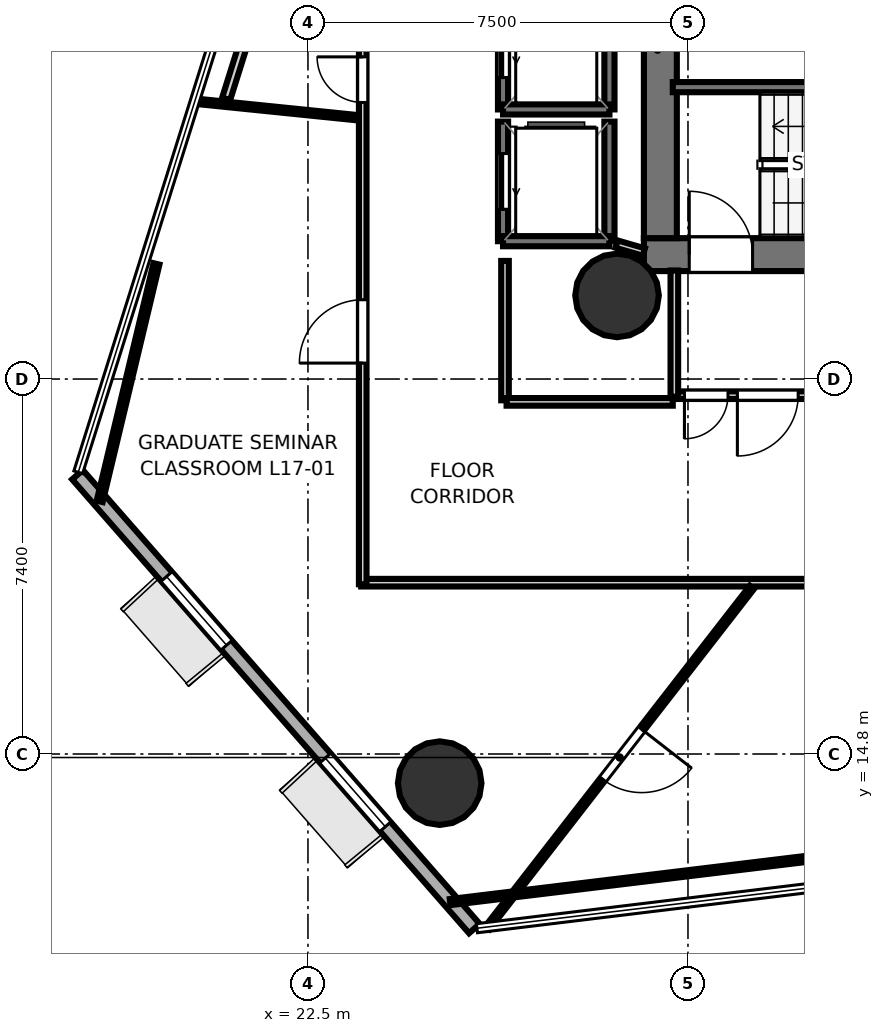
"""IFC4 building model, lengths in metres.
Left out: names, types, materials, properties, quantities, classifications, styles, units other than length and angle.
Written with IfcOpenShell. Run it as: python <this file> out.ifc"""

import sys

from ifc_helpers import new_model, si_unit, direction, frame, frame_2d, origin, origin_2d, place, context, subcontext, project, spatial, rectangle, hollow_circle, extrude, element, fill, save


model = new_model("IFC4")
c1 = context("Model", 3, precision=1e-05, world=origin(), true_north=direction((0.0, 1.0)))
c2 = subcontext(c1, "Body", "Model", "MODEL_VIEW")
j1 = project(units=[si_unit("LENGTHUNIT", "METRE"), si_unit("PLANEANGLEUNIT", "RADIAN")], contexts=[c1])
p1 = place(None, origin())
s1 = spatial("IfcSite", under=j1, at=p1, CompositionType="ELEMENT")
p2 = place(p1, origin())
s2 = spatial("IfcBuilding", under=s1, at=p2, CompositionType="ELEMENT")
p3 = place(p2, frame((0.0, 0.0, 71.0)))
s3 = spatial("IfcBuildingStorey", under=s2, at=p3, CompositionType="ELEMENT", Elevation=71.0)
p4 = place(p3, frame((29.13, 24.655, 0.0), z_axis=(0.0, 0.0, 1.0), x_axis=(1.0, 0.0, 0.0)))
e1 = element("IfcWall", 1, at=p4, inside=s3, PredefinedType="SHEAR", context=c2, shape_type="SweptSolid", body=[
    extrude(rectangle(XDim=10.72, YDim=0.65, at=frame_2d((5.36, 0.0))), origin(), (0.0, 0.0, 1.0), 3.52),
])
p5 = place(p4, frame((0.895, 0.0, 0.0)))
e2 = element("IfcOpeningElement", 2, at=p5, cuts=e1, PredefinedType="OPENING", context=c2, shape_type="SweptSolid", body=[
    extrude(rectangle(XDim=1.25, YDim=2.15, at=frame_2d((0.625, 1.075))), frame((0.0, 0.335, 0.0), z_axis=(0.0, -1.0, 0.0), x_axis=(1.0, 0.0, 0.0)), (0.0, 0.0, 1.0), 0.67),
])
p6 = place(p3, frame((29.455, 24.98, 0.0), z_axis=(0.0, 0.0, 1.0), x_axis=(0.0, 1.0, 0.0)))
e3 = element("IfcWall", 3, at=p6, inside=s3, PredefinedType="SHEAR", context=c2, shape_type="SweptSolid", body=[
    extrude(rectangle(XDim=7.44, YDim=0.65, at=frame_2d((3.72, 0.0))), origin(), (0.0, 0.0, 1.0), 3.52),
])
for number, where, z_axis, x_axis in (
    (4, (28.6, 23.85, 0.0), (0.0, 0.0, 1.0), (1.0, 0.0, 0.0)),
    (5, (25.1, 14.225, 0.0), (0.0, 0.0, 1.0), (1.0, 0.0, 0.0)),
):
    element("IfcColumn", number, at=place(p3, frame(where, z_axis=z_axis, x_axis=x_axis)), inside=s3, PredefinedType="COLUMN", context=c2, shape_type="SweptSolid", body=[
        extrude(hollow_circle(Radius=0.825, WallThickness=0.04, at=origin_2d()), origin(), (0.0, 0.0, 1.0), 3.7),
    ])
p7 = place(p3, frame((17.952, 20.312, 0.0), z_axis=(0.0, 0.0, 1.0), x_axis=(0.658347705973, -0.752713954992, 0.0)))
e6 = element("IfcWall", 6, at=p7, inside=s3, PredefinedType="SOLIDWALL", context=c2, shape_type="SweptSolid", body=[
    extrude(rectangle(XDim=11.898, YDim=0.28, at=frame_2d((5.949, 0.0))), origin(), (0.0, 0.0, 1.0), 3.52),
])
p8 = place(p7, frame((2.669, 0.0, 0.85)))
e7 = element("IfcOpeningElement", 7, at=p8, cuts=e6, PredefinedType="OPENING", context=c2, shape_type="SweptSolid", body=[
    extrude(rectangle(XDim=1.8, YDim=2.1, at=frame_2d((0.9, 1.05))), frame((0.0, 0.15, 0.0), z_axis=(0.0, -1.0, 0.0), x_axis=(1.0, 0.0, 0.0)), (0.0, 0.0, 1.0), 0.3),
])
p9 = place(p7, frame((7.429, 0.0, 0.85)))
e8 = element("IfcOpeningElement", 8, at=p9, cuts=e6, PredefinedType="OPENING", context=c2, shape_type="SweptSolid", body=[
    extrude(rectangle(XDim=1.8, YDim=2.1, at=frame_2d((0.9, 1.05))), frame((0.0, 0.15, 0.0), z_axis=(0.0, -1.0, 0.0), x_axis=(1.0, 0.0, 0.0)), (0.0, 0.0, 1.0), 0.3),
])
p10 = place(p3, frame((29.7, 27.96, 0.0), z_axis=(0.0, 0.0, 1.0), x_axis=(1.0, 0.0, 0.0)))
e9 = element("IfcWall", 9, at=p10, inside=s3, PredefinedType="SOLIDWALL", context=c2, shape_type="SweptSolid", body=[
    extrude(rectangle(XDim=7.75, YDim=0.2, at=frame_2d((3.875, 0.0))), origin(), (0.0, 0.0, 1.0), 3.52),
])
p11 = place(p3, frame((28.45, 27.52, 0.0), z_axis=(0.0, 0.0, 1.0), x_axis=(0.0, 1.0, 0.0)))
e10 = element("IfcWall", 10, at=p11, inside=s3, PredefinedType="SOLIDWALL", context=c2, shape_type="SweptSolid", body=[
    extrude(rectangle(XDim=2.36, YDim=0.2, at=frame_2d((1.18, 0.0))), origin(), (0.0, 0.0, 1.0), 3.52),
])
p12 = place(p3, frame((26.35, 27.52, 0.0), z_axis=(0.0, 0.0, 1.0), x_axis=(0.0, 1.0, 0.0)))
e11 = element("IfcWall", 11, at=p12, inside=s3, PredefinedType="SOLIDWALL", context=c2, shape_type="SweptSolid", body=[
    extrude(rectangle(XDim=2.36, YDim=0.2, at=frame_2d((1.18, 0.0))), origin(), (0.0, 0.0, 1.0), 3.52),
])
p13 = place(p12, frame((0.63, 0.0, 0.0)))
e12 = element("IfcOpeningElement", 12, at=p13, cuts=e11, PredefinedType="OPENING", context=c2, shape_type="SweptSolid", body=[
    extrude(rectangle(XDim=1.1, YDim=2.15, at=frame_2d((0.55, 1.075))), frame((0.0, 0.11, 0.0), z_axis=(0.0, -1.0, 0.0), x_axis=(1.0, 0.0, 0.0)), (0.0, 0.0, 1.0), 0.22),
])
p14 = place(p3, frame((26.35, 27.52, 0.0), z_axis=(0.0, 0.0, 1.0), x_axis=(1.0, 0.0, 0.0)))
e13 = element("IfcWall", 13, at=p14, inside=s3, PredefinedType="SOLIDWALL", context=c2, shape_type="SweptSolid", body=[
    extrude(rectangle(XDim=2.1, YDim=0.2, at=frame_2d((1.05, 0.0))), origin(), (0.0, 0.0, 1.0), 3.52),
])
p15 = place(p3, frame((28.45, 24.92, 0.0), z_axis=(0.0, 0.0, 1.0), x_axis=(0.0, 1.0, 0.0)))
e14 = element("IfcWall", 14, at=p15, inside=s3, PredefinedType="SOLIDWALL", context=c2, shape_type="SweptSolid", body=[
    extrude(rectangle(XDim=2.36, YDim=0.2, at=frame_2d((1.18, 0.0))), origin(), (0.0, 0.0, 1.0), 3.52),
])
p16 = place(p3, frame((26.35, 24.92, 0.0), z_axis=(0.0, 0.0, 1.0), x_axis=(0.0, 1.0, 0.0)))
e15 = element("IfcWall", 15, at=p16, inside=s3, PredefinedType="SOLIDWALL", context=c2, shape_type="SweptSolid", body=[
    extrude(rectangle(XDim=2.36, YDim=0.2, at=frame_2d((1.18, 0.0))), origin(), (0.0, 0.0, 1.0), 3.52),
])
p17 = place(p16, frame((0.63, 0.0, 0.0)))
e16 = element("IfcOpeningElement", 16, at=p17, cuts=e15, PredefinedType="OPENING", context=c2, shape_type="SweptSolid", body=[
    extrude(rectangle(XDim=1.1, YDim=2.15, at=frame_2d((0.55, 1.075))), frame((0.0, 0.11, 0.0), z_axis=(0.0, -1.0, 0.0), x_axis=(1.0, 0.0, 0.0)), (0.0, 0.0, 1.0), 0.22),
])
p18 = place(p3, frame((26.35, 24.92, 0.0), z_axis=(0.0, 0.0, 1.0), x_axis=(1.0, 0.0, 0.0)))
e17 = element("IfcWall", 17, at=p18, inside=s3, PredefinedType="SOLIDWALL", context=c2, shape_type="SweptSolid", body=[
    extrude(rectangle(XDim=2.1, YDim=0.2, at=frame_2d((1.05, 0.0))), origin(), (0.0, 0.0, 1.0), 3.52),
])
p19 = place(p3, frame((33.45, 21.881, 0.0), z_axis=(0.0, 0.0, 1.0), x_axis=(-1.0, 0.0, 0.0)))
e18 = element("IfcWall", 18, at=p19, inside=s3, PredefinedType="PARTITIONING", context=c2, shape_type="SweptSolid", body=[
    extrude(rectangle(XDim=3.75, YDim=0.15, at=frame_2d((1.875, 0.0))), origin(), (0.0, 0.0, 1.0), 2.84),
])
p20 = place(p19, frame((1.275, 0.0, 0.0)))
e19 = element("IfcOpeningElement", 19, at=p20, cuts=e18, PredefinedType="OPENING", context=c2, shape_type="SweptSolid", body=[
    extrude(rectangle(XDim=1.2, YDim=2.15, at=frame_2d((0.6, 1.075))), frame((0.0, 0.085, 0.0), z_axis=(0.0, -1.0, 0.0), x_axis=(1.0, 0.0, 0.0)), (0.0, 0.0, 1.0), 0.17),
])
p21 = place(p19, frame((2.66, 0.0, 0.0)))
e20 = element("IfcOpeningElement", 20, at=p21, cuts=e18, PredefinedType="OPENING", context=c2, shape_type="SweptSolid", body=[
    extrude(rectangle(XDim=0.86, YDim=2.05, at=frame_2d((0.43, 1.025))), frame((0.0, 0.085, 0.0), z_axis=(0.0, -1.0, 0.0), x_axis=(1.0, 0.0, 0.0)), (0.0, 0.0, 1.0), 0.17),
])
p22 = place(p3, frame((29.731, 21.85, 0.0), z_axis=(0.0, 0.0, 1.0), x_axis=(0.0, 1.0, 0.0)))
e21 = element("IfcWall", 21, at=p22, inside=s3, PredefinedType="PARTITIONING", context=c2, shape_type="SweptSolid", body=[
    extrude(rectangle(XDim=2.492, YDim=0.15, at=frame_2d((1.246, 0.0))), origin(), (0.0, 0.0, 1.0), 2.84),
])
p23 = place(p3, frame((29.13, 24.706, 0.0), z_axis=(0.0, 0.0, 1.0), x_axis=(-0.960451214223, 0.278448316742, 0.0)))
e22 = element("IfcWall", 22, at=p23, inside=s3, PredefinedType="PARTITIONING", context=c2, shape_type="SweptSolid", body=[
    extrude(rectangle(XDim=0.562, YDim=0.15, at=frame_2d((0.281, 0.0))), origin(), (0.0, 0.0, 1.0), 2.84),
])
p24 = place(p3, frame((26.389, 24.531, 0.0), z_axis=(0.0, 0.0, 1.0), x_axis=(0.0, -1.0, 0.0)))
e23 = element("IfcWall", 23, at=p24, inside=s3, PredefinedType="PARTITIONING", context=c2, shape_type="SweptSolid", body=[
    extrude(rectangle(XDim=2.75, YDim=0.15, at=frame_2d((1.375, 0.0))), origin(), (0.0, 0.0, 1.0), 2.84),
])
p25 = place(p3, frame((26.42, 21.749, 0.0), z_axis=(0.0, 0.0, 1.0), x_axis=(1.0, 0.0, 0.0)))
e24 = element("IfcWall", 24, at=p25, inside=s3, PredefinedType="PARTITIONING", context=c2, shape_type="SweptSolid", body=[
    extrude(rectangle(XDim=3.28, YDim=0.15, at=frame_2d((1.64, 0.0))), origin(), (0.0, 0.0, 1.0), 2.84),
])
p26 = place(p3, frame((33.32, 18.181, 0.0), z_axis=(0.0, 0.0, 1.0), x_axis=(-1.0, 0.0, 0.0)))
e25 = element("IfcWall", 25, at=p26, inside=s3, PredefinedType="PARTITIONING", context=c2, shape_type="SweptSolid", body=[
    extrude(rectangle(XDim=9.77, YDim=0.15, at=frame_2d((4.885, 0.0))), origin(), (0.0, 0.0, 1.0), 2.798),
])
p27 = place(p3, frame((23.581, 18.15, 0.0), z_axis=(0.0, 0.0, 1.0), x_axis=(0.0, 1.0, 0.0)))
e26 = element("IfcWall", 26, at=p27, inside=s3, PredefinedType="PARTITIONING", context=c2, shape_type="SweptSolid", body=[
    extrude(rectangle(XDim=11.333, YDim=0.15, at=frame_2d((5.667, 0.0))), origin(), (0.0, 0.0, 1.0), 2.798),
])
p28 = place(p27, frame((4.365, 0.0, 0.0)))
e27 = element("IfcOpeningElement", 27, at=p28, cuts=e26, PredefinedType="OPENING", context=c2, shape_type="SweptSolid", body=[
    extrude(rectangle(XDim=1.25, YDim=2.2, at=frame_2d((0.625, 1.1))), frame((0.0, 0.085, 0.0), z_axis=(0.0, -1.0, 0.0), x_axis=(1.0, 0.0, 0.0)), (0.0, 0.0, 1.0), 0.17),
])
p29 = place(p27, frame((9.507, 0.0, 0.0)))
e28 = element("IfcOpeningElement", 28, at=p29, cuts=e26, PredefinedType="OPENING", context=c2, shape_type="SweptSolid", body=[
    extrude(rectangle(XDim=0.9, YDim=2.1, at=frame_2d((0.45, 1.05))), frame((0.0, 0.085, 0.0), z_axis=(0.0, -1.0, 0.0), x_axis=(1.0, 0.0, 0.0)), (0.0, 0.0, 1.0), 0.17),
])
p30 = place(p3, frame((31.262, 18.089, 0.0), z_axis=(0.0, 0.0, 1.0), x_axis=(-0.613499332292, -0.789695238226, 0.0)))
e29 = element("IfcWall", 29, at=p30, inside=s3, PredefinedType="PARTITIONING", context=c2, shape_type="SweptSolid", body=[
    extrude(rectangle(XDim=8.505, YDim=0.105, at=frame_2d((4.252, 0.0))), origin(), (0.0, 0.0, 1.0), 2.798),
])
p31 = place(p30, frame((3.547, 0.0, 0.0)))
e30 = element("IfcOpeningElement", 30, at=p31, cuts=e29, PredefinedType="OPENING", context=c2, shape_type="SweptSolid", body=[
    extrude(rectangle(XDim=1.25, YDim=2.2, at=frame_2d((0.625, 1.1))), frame((0.0, 0.062, 0.0), z_axis=(0.0, -1.0, 0.0), x_axis=(1.0, 0.0, 0.0)), (0.0, 0.0, 1.0), 0.125),
])
p32 = place(p3, frame((18.39, 19.785, 0.0), z_axis=(0.0, 0.0, 1.0), x_axis=(0.23249925899, 0.97259657339, 0.0)))
e31 = element("IfcWall", 31, at=p32, inside=s3, PredefinedType="PARTITIONING", context=c2, shape_type="SweptSolid", body=[
    extrude(rectangle(XDim=4.82, YDim=0.12, at=frame_2d((2.41, 0.0))), origin(), (0.0, 0.0, 1.0), 2.84),
])
p33 = place(p3, frame((20.248, 27.686, 0.0), z_axis=(0.0, 0.0, 1.0), x_axis=(0.994844867068, -0.101408532525, 0.0)))
e32 = element("IfcWall", 32, at=p33, inside=s3, PredefinedType="PARTITIONING", context=c2, shape_type="SweptSolid", body=[
    extrude(rectangle(XDim=3.236, YDim=0.105, at=frame_2d((1.618, 0.0))), origin(), (0.0, 0.0, 1.0), 2.798),
])
p34 = place(p3, frame((55.221, 15.505, 0.0), z_axis=(0.0, 0.0, 1.0), x_axis=(-0.992729059423, -0.120370322663, 0.0)))
e33 = element("IfcWall", 33, at=p34, inside=s3, PredefinedType="PARTITIONING", context=c2, shape_type="SweptSolid", body=[
    extrude(rectangle(XDim=30.134, YDim=0.12, at=frame_2d((15.067, 0.0))), origin(), (0.0, 0.0, 1.0), 2.798),
])
p35 = place(p3, frame((20.886, 27.73, 0.0), z_axis=(0.0, 0.0, 1.0), x_axis=(0.299685371056, 0.954038090631, 0.0)))
e34 = element("IfcWall", 34, at=p35, inside=s3, PredefinedType="PLUMBINGWALL", context=c2, shape_type="SweptSolid", body=[
    extrude(rectangle(XDim=8.721, YDim=0.165, at=frame_2d((4.36, 0.0))), origin(), (0.0, 0.0, 1.0), 2.798),
])
p36 = place(p5, origin())
e35 = element("IfcDoor", 35, at=p36, inside=s3, OperationType="SINGLE_SWING_LEFT", PredefinedType="DOOR", context=c2, shape_type="SweptSolid", body=[
    extrude(rectangle(XDim=1.25, YDim=2.15, at=frame_2d((0.625, 1.075))), frame((0.0, 0.025, 0.0), z_axis=(0.0, -1.0, 0.0), x_axis=(1.0, 0.0, 0.0)), (0.0, 0.0, 1.0), 0.05),
])
fill(e2, e35)
p37 = place(p13, origin())
e36 = element("IfcDoor", 36, at=p37, inside=s3, OperationType="SLIDING_TO_LEFT", PredefinedType="DOOR", context=c2, shape_type="SweptSolid", body=[
    extrude(rectangle(XDim=1.1, YDim=2.15, at=frame_2d((0.55, 1.075))), frame((0.0, 0.025, 0.0), z_axis=(0.0, -1.0, 0.0), x_axis=(1.0, 0.0, 0.0)), (0.0, 0.0, 1.0), 0.05),
])
fill(e12, e36)
p38 = place(p17, origin())
e37 = element("IfcDoor", 37, at=p38, inside=s3, OperationType="SLIDING_TO_LEFT", PredefinedType="DOOR", context=c2, shape_type="SweptSolid", body=[
    extrude(rectangle(XDim=1.1, YDim=2.15, at=frame_2d((0.55, 1.075))), frame((0.0, 0.025, 0.0), z_axis=(0.0, -1.0, 0.0), x_axis=(1.0, 0.0, 0.0)), (0.0, 0.0, 1.0), 0.05),
])
fill(e16, e37)
p39 = place(p20, origin())
e38 = element("IfcDoor", 38, at=p39, inside=s3, OperationType="SINGLE_SWING_RIGHT", PredefinedType="DOOR", context=c2, shape_type="SweptSolid", body=[
    extrude(rectangle(XDim=1.2, YDim=2.15, at=frame_2d((0.6, 1.075))), frame((0.0, 0.025, 0.0), z_axis=(0.0, -1.0, 0.0), x_axis=(1.0, 0.0, 0.0)), (0.0, 0.0, 1.0), 0.05),
])
fill(e19, e38)
p40 = place(p21, origin())
e39 = element("IfcDoor", 39, at=p40, inside=s3, OperationType="SINGLE_SWING_RIGHT", PredefinedType="DOOR", context=c2, shape_type="SweptSolid", body=[
    extrude(rectangle(XDim=0.86, YDim=2.05, at=frame_2d((0.43, 1.025))), frame((0.0, 0.025, 0.0), z_axis=(0.0, -1.0, 0.0), x_axis=(1.0, 0.0, 0.0)), (0.0, 0.0, 1.0), 0.05),
])
fill(e20, e39)
p41 = place(p28, origin())
e40 = element("IfcDoor", 40, at=p41, inside=s3, OperationType="SINGLE_SWING_LEFT", PredefinedType="DOOR", context=c2, shape_type="SweptSolid", body=[
    extrude(rectangle(XDim=1.25, YDim=2.2, at=frame_2d((0.625, 1.1))), frame((0.0, 0.025, 0.0), z_axis=(0.0, -1.0, 0.0), x_axis=(1.0, 0.0, 0.0)), (0.0, 0.0, 1.0), 0.05),
])
fill(e27, e40)
p42 = place(p29, origin())
e41 = element("IfcDoor", 41, at=p42, inside=s3, OperationType="SINGLE_SWING_RIGHT", PredefinedType="DOOR", context=c2, shape_type="SweptSolid", body=[
    extrude(rectangle(XDim=0.9, YDim=2.1, at=frame_2d((0.45, 1.05))), frame((0.0, 0.025, 0.0), z_axis=(0.0, -1.0, 0.0), x_axis=(1.0, 0.0, 0.0)), (0.0, 0.0, 1.0), 0.05),
])
fill(e28, e41)
p43 = place(p31, origin())
e42 = element("IfcDoor", 42, at=p43, inside=s3, OperationType="SINGLE_SWING_LEFT", PredefinedType="DOOR", context=c2, shape_type="SweptSolid", body=[
    extrude(rectangle(XDim=1.25, YDim=2.2, at=frame_2d((0.625, 1.1))), frame((0.0, 0.025, 0.0), z_axis=(0.0, -1.0, 0.0), x_axis=(1.0, 0.0, 0.0)), (0.0, 0.0, 1.0), 0.05),
])
fill(e30, e42)
p44 = place(p8, origin())
e43 = element("IfcWindow", 43, at=p44, inside=s3, PartitioningType="SINGLE_PANEL", PredefinedType="WINDOW", context=c2, shape_type="SweptSolid", body=[
    extrude(rectangle(XDim=1.8, YDim=2.1, at=frame_2d((0.9, 1.05))), frame((0.0, 0.03, 0.0), z_axis=(0.0, -1.0, 0.0), x_axis=(1.0, 0.0, 0.0)), (0.0, 0.0, 1.0), 0.06),
])
fill(e7, e43)
p45 = place(p9, origin())
e44 = element("IfcWindow", 44, at=p45, inside=s3, PartitioningType="SINGLE_PANEL", PredefinedType="WINDOW", context=c2, shape_type="SweptSolid", body=[
    extrude(rectangle(XDim=1.8, YDim=2.1, at=frame_2d((0.9, 1.05))), frame((0.0, 0.03, 0.0), z_axis=(0.0, -1.0, 0.0), x_axis=(1.0, 0.0, 0.0)), (0.0, 0.0, 1.0), 0.06),
])
fill(e8, e44)
save(model, sys.argv[1])
